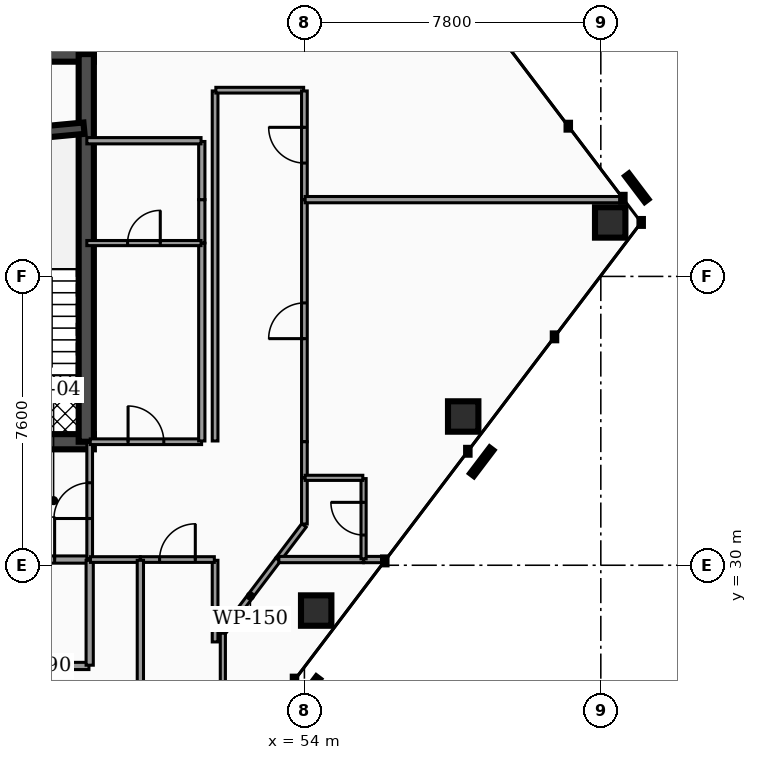
"""IFC4 building model, lengths in metres.
Left out: names, types, materials, properties, quantities, classifications, styles, units other than length and angle.
Written with IfcOpenShell. Run it as: python <this file> out.ifc"""

import sys

from ifc_helpers import new_model, si_unit, direction, frame, frame_2d, origin, origin_2d, place, context, subcontext, project, spatial, rectangle, hollow_rectangle, extrude, element, fill, save


model = new_model("IFC4")
c1 = context("Model", 3, precision=1e-05, world=origin(), true_north=direction((0.0, 1.0)))
c2 = subcontext(c1, "Body", "Model", "MODEL_VIEW")
j1 = project(units=[si_unit("LENGTHUNIT", "METRE"), si_unit("PLANEANGLEUNIT", "RADIAN")], contexts=[c1])
p1 = place(None, origin())
s1 = spatial("IfcSite", under=j1, at=p1, CompositionType="ELEMENT")
p2 = place(p1, origin())
s2 = spatial("IfcBuilding", under=s1, at=p2, CompositionType="ELEMENT")
p3 = place(p2, frame((0.0, 0.0, 138.38)))
s3 = spatial("IfcBuildingStorey", under=s2, at=p3, CompositionType="ELEMENT", Elevation=138.38)
p4 = place(p3, frame((28.4, 43.45, 0.0), z_axis=(0.0, 0.0, 1.0), x_axis=(1.0, 0.0, 0.0)))
e1 = element("IfcWall", 1, at=p4, inside=s3, PredefinedType="SHEAR", context=c2, shape_type="SweptSolid", body=[
    extrude(rectangle(XDim=20.06, YDim=0.4, at=frame_2d((10.03, 0.0))), origin(), (0.0, 0.0, 1.0), 3.5),
])
p5 = place(p3, frame((28.4, 33.25, 0.0), z_axis=(0.0, 0.0, 1.0), x_axis=(1.0, 0.0, 0.0)))
e2 = element("IfcWall", 2, at=p5, inside=s3, PredefinedType="SHEAR", context=c2, shape_type="SweptSolid", body=[
    extrude(rectangle(XDim=20.06, YDim=0.4, at=frame_2d((10.03, 0.0))), origin(), (0.0, 0.0, 1.0), 3.5),
])
p6 = place(p5, frame((4.03, 0.0, 0.0)))
e3 = element("IfcOpeningElement", 3, at=p6, cuts=e2, PredefinedType="OPENING", context=c2, shape_type="SweptSolid", body=[
    extrude(rectangle(XDim=1.1, YDim=2.15, at=frame_2d((0.55, 1.075))), frame((0.0, 0.21, 0.0), z_axis=(0.0, -1.0, 0.0), x_axis=(1.0, 0.0, 0.0)), (0.0, 0.0, 1.0), 0.42),
])
p7 = place(p5, frame((14.87, 0.0, 0.0)))
e4 = element("IfcOpeningElement", 4, at=p7, cuts=e2, PredefinedType="OPENING", context=c2, shape_type="SweptSolid", body=[
    extrude(rectangle(XDim=1.1, YDim=2.15, at=frame_2d((0.55, 1.075))), frame((0.0, 0.21, 0.0), z_axis=(0.0, -1.0, 0.0), x_axis=(1.0, 0.0, 0.0)), (0.0, 0.0, 1.0), 0.42),
])
p8 = place(p5, frame((5.95, 0.0, 0.0)))
e5 = element("IfcOpeningElement", 5, at=p8, cuts=e2, PredefinedType="OPENING", context=c2, shape_type="SweptSolid", body=[
    extrude(rectangle(XDim=1.0, YDim=2.1, at=frame_2d((0.5, 1.05))), frame((0.0, 0.21, 0.0), z_axis=(0.0, -1.0, 0.0), x_axis=(1.0, 0.0, 0.0)), (0.0, 0.0, 1.0), 0.42),
])
p9 = place(p5, frame((7.65, 0.0, 0.0)))
e6 = element("IfcOpeningElement", 6, at=p9, cuts=e2, PredefinedType="OPENING", context=c2, shape_type="SweptSolid", body=[
    extrude(rectangle(XDim=1.0, YDim=2.1, at=frame_2d((0.5, 1.05))), frame((0.0, 0.21, 0.0), z_axis=(0.0, -1.0, 0.0), x_axis=(1.0, 0.0, 0.0)), (0.0, 0.0, 1.0), 0.42),
])
p10 = place(p5, frame((1.31, 0.0, 0.0)))
e7 = element("IfcOpeningElement", 7, at=p10, cuts=e2, PredefinedType="OPENING", context=c2, shape_type="SweptSolid", body=[
    extrude(rectangle(XDim=1.1, YDim=2.2, at=frame_2d((0.55, 1.1))), frame((0.0, 0.21, 0.0), z_axis=(0.0, -1.0, 0.0), x_axis=(1.0, 0.0, 0.0)), (0.0, 0.0, 1.0), 0.42),
])
p11 = place(p5, frame((9.44, 0.0, 0.0)))
e8 = element("IfcOpeningElement", 8, at=p11, cuts=e2, PredefinedType="OPENING", context=c2, shape_type="SweptSolid", body=[
    extrude(rectangle(XDim=1.12, YDim=2.05, at=frame_2d((0.56, 1.025))), frame((0.0, 0.21, 0.0), z_axis=(0.0, -1.0, 0.0), x_axis=(1.0, 0.0, 0.0)), (0.0, 0.0, 1.0), 0.42),
])
p12 = place(p5, frame((17.65, 0.0, 0.0)))
e9 = element("IfcOpeningElement", 9, at=p12, cuts=e2, PredefinedType="OPENING", context=c2, shape_type="SweptSolid", body=[
    extrude(rectangle(XDim=1.1, YDim=2.2, at=frame_2d((0.55, 1.1))), frame((0.0, 0.21, 0.0), z_axis=(0.0, -1.0, 0.0), x_axis=(1.0, 0.0, 0.0)), (0.0, 0.0, 1.0), 0.42),
])
p13 = place(p3, frame((48.26, 33.25, 0.0), z_axis=(0.0, 0.0, 1.0), x_axis=(0.0, 1.0, 0.0)))
e10 = element("IfcWall", 10, at=p13, inside=s3, PredefinedType="SHEAR", context=c2, shape_type="SweptSolid", body=[
    extrude(rectangle(XDim=10.2, YDim=0.4, at=frame_2d((5.1, 0.0))), origin(), (0.0, 0.0, 1.0), 3.5),
])
p14 = place(p3, frame((44.98, 41.2, 0.0), z_axis=(0.0, 0.0, 1.0), x_axis=(0.995686468965, 0.09278176286, 0.0)))
e11 = element("IfcWall", 11, at=p14, inside=s3, PredefinedType="SHEAR", context=c2, shape_type="SweptSolid", body=[
    extrude(rectangle(XDim=3.234, YDim=0.3, at=frame_2d((1.617, 0.0))), origin(), (0.0, 0.0, 1.0), 3.5),
])
for number, where, z_axis, x_axis in (
    (12, (54.31, 28.808, 0.0), (0.0, 0.0, 1.0), (1.0, 0.0, 0.0)),
    (13, (58.178, 33.914, 0.0), (0.0, 0.0, 1.0), (1.0, 0.0, 0.0)),
    (14, (62.047, 39.02, 0.0), (0.0, 0.0, 1.0), (1.0, 0.0, 0.0)),
):
    element("IfcColumn", number, at=place(p3, frame(where, z_axis=z_axis, x_axis=x_axis)), inside=s3, PredefinedType="COLUMN", context=c2, shape_type="SweptSolid", body=[
        extrude(hollow_rectangle(XDim=0.8, YDim=0.8, WallThickness=0.04, at=origin_2d()), origin(), (0.0, 0.0, 1.0), 3.5),
    ])
p15 = place(p3, frame((45.405, 30.15, 0.0), z_axis=(0.0, 0.0, 1.0), x_axis=(1.0, 0.0, 0.0)))
e15 = element("IfcWall", 15, at=p15, inside=s3, PredefinedType="PARTITIONING", context=c2, shape_type="SweptSolid", body=[
    extrude(rectangle(XDim=2.925, YDim=0.19, at=frame_2d((1.462, 0.0))), origin(), (0.0, 0.0, 1.0), 2.457),
])
p16 = place(p15, frame((0.903, 0.0, 0.0)))
e16 = element("IfcOpeningElement", 16, at=p16, cuts=e15, PredefinedType="OPENING", context=c2, shape_type="SweptSolid", body=[
    extrude(rectangle(XDim=1.12, YDim=2.05, at=frame_2d((0.56, 1.025))), frame((0.0, 0.105, 0.0), z_axis=(0.0, -1.0, 0.0), x_axis=(1.0, 0.0, 0.0)), (0.0, 0.0, 1.0), 0.21),
])
p17 = place(p3, frame((48.35, 30.17, 0.0), z_axis=(0.0, 0.0, 1.0), x_axis=(0.0, 1.0, 0.0)))
e17 = element("IfcWall", 17, at=p17, inside=s3, PredefinedType="PARTITIONING", context=c2, shape_type="SweptSolid", body=[
    extrude(rectangle(XDim=3.06, YDim=0.15, at=frame_2d((1.53, 0.0))), origin(), (0.0, 0.0, 1.0), 2.457),
])
p18 = place(p17, frame((1.06, 0.0, 0.0)))
e18 = element("IfcOpeningElement", 18, at=p18, cuts=e17, PredefinedType="OPENING", context=c2, shape_type="SweptSolid", body=[
    extrude(rectangle(XDim=0.94, YDim=2.05, at=frame_2d((0.47, 1.025))), frame((0.0, 0.085, 0.0), z_axis=(0.0, -1.0, 0.0), x_axis=(1.0, 0.0, 0.0)), (0.0, 0.0, 1.0), 0.17),
])
p19 = place(p3, frame((45.42, 27.35, 0.0), z_axis=(0.0, 0.0, 1.0), x_axis=(1.0, 0.0, 0.0)))
e19 = element("IfcWall", 19, at=p19, inside=s3, PredefinedType="PARTITIONING", context=c2, shape_type="SweptSolid", body=[
    extrude(rectangle(XDim=2.91, YDim=0.19, at=frame_2d((1.455, 0.0))), origin(), (0.0, 0.0, 1.0), 2.457),
])
p20 = place(p3, frame((48.35, 27.37, 0.0), z_axis=(0.0, 0.0, 1.0), x_axis=(0.0, 1.0, 0.0)))
e20 = element("IfcWall", 20, at=p20, inside=s3, PredefinedType="PARTITIONING", context=c2, shape_type="SweptSolid", body=[
    extrude(rectangle(XDim=2.76, YDim=0.19, at=frame_2d((1.38, 0.0))), origin(), (0.0, 0.0, 1.0), 2.457),
])
p21 = place(p3, frame((48.37, 30.15, 0.0), z_axis=(0.0, 0.0, 1.0), x_axis=(1.0, 0.0, 0.0)))
e21 = element("IfcWall", 21, at=p21, inside=s3, PredefinedType="PARTITIONING", context=c2, shape_type="SweptSolid", body=[
    extrude(rectangle(XDim=1.309, YDim=0.15, at=frame_2d((0.654, 0.0))), origin(), (0.0, 0.0, 1.0), 2.457),
])
p22 = place(p3, frame((51.65, 27.982, 0.0), z_axis=(0.0, 0.0, 1.0), x_axis=(0.0, 1.0, 0.0)))
e22 = element("IfcWall", 22, at=p22, inside=s3, PredefinedType="PARTITIONING", context=c2, shape_type="SweptSolid", body=[
    extrude(rectangle(XDim=2.147, YDim=0.15, at=frame_2d((1.074, 0.0))), origin(), (0.0, 0.0, 1.0), 2.457),
])
p23 = place(p3, frame((49.689, 30.15, 0.0), z_axis=(0.0, 0.0, 1.0), x_axis=(1.0, 0.0, 0.0)))
e23 = element("IfcWall", 23, at=p23, inside=s3, PredefinedType="PARTITIONING", context=c2, shape_type="SweptSolid", body=[
    extrude(rectangle(XDim=1.941, YDim=0.15, at=frame_2d((0.971, 0.0))), origin(), (0.0, 0.0, 1.0), 2.457),
])
p24 = place(p23, frame((0.501, 0.0, 0.0)))
e24 = element("IfcOpeningElement", 24, at=p24, cuts=e23, PredefinedType="OPENING", context=c2, shape_type="SweptSolid", body=[
    extrude(rectangle(XDim=0.94, YDim=2.05, at=frame_2d((0.47, 1.025))), frame((0.0, 0.085, 0.0), z_axis=(0.0, -1.0, 0.0), x_axis=(1.0, 0.0, 0.0)), (0.0, 0.0, 1.0), 0.17),
])
p25 = place(p3, frame((51.851, 28.228, 0.0), z_axis=(0.0, 0.0, 1.0), x_axis=(0.60378553019, 0.797146808018, 0.0)))
e25 = element("IfcWall", 25, at=p25, inside=s3, PredefinedType="PARTITIONING", context=c2, shape_type="SweptSolid", body=[
    extrude(rectangle(XDim=2.41, YDim=0.15, at=frame_2d((1.205, 0.0))), origin(), (0.0, 0.0, 1.0), 2.457),
])
p26 = place(p3, frame((54.0, 33.25, 0.0), z_axis=(0.0, 0.0, 1.0), x_axis=(0.0, 1.0, 0.0)))
e26 = element("IfcWall", 26, at=p26, inside=s3, PredefinedType="PARTITIONING", context=c2, shape_type="SweptSolid", body=[
    extrude(rectangle(XDim=6.365, YDim=0.15, at=frame_2d((3.183, 0.0))), origin(), (0.0, 0.0, 1.0), 2.457),
])
p27 = place(p26, frame((2.712, 0.0, 0.0)))
e27 = element("IfcOpeningElement", 27, at=p27, cuts=e26, PredefinedType="OPENING", context=c2, shape_type="SweptSolid", body=[
    extrude(rectangle(XDim=0.94, YDim=2.05, at=frame_2d((0.47, 1.025))), frame((0.0, 0.085, 0.0), z_axis=(0.0, -1.0, 0.0), x_axis=(1.0, 0.0, 0.0)), (0.0, 0.0, 1.0), 0.17),
])
p28 = place(p3, frame((54.0, 32.305, 0.0), z_axis=(0.0, 0.0, 1.0), x_axis=(0.0, 1.0, 0.0)))
e28 = element("IfcWall", 28, at=p28, inside=s3, PredefinedType="PARTITIONING", context=c2, shape_type="SweptSolid", body=[
    extrude(rectangle(XDim=0.945, YDim=0.15, at=frame_2d((0.473, 0.0))), origin(), (0.0, 0.0, 1.0), 2.457),
])
p29 = place(p3, frame((54.0, 31.085, 0.0), z_axis=(0.0, 0.0, 1.0), x_axis=(0.0, 1.0, 0.0)))
e29 = element("IfcWall", 29, at=p29, inside=s3, PredefinedType="PARTITIONING", context=c2, shape_type="SweptSolid", body=[
    extrude(rectangle(XDim=1.21, YDim=0.15, at=frame_2d((0.605, 0.0))), origin(), (0.0, 0.0, 1.0), 2.457),
])
p30 = place(p3, frame((53.31, 30.154, 0.0), z_axis=(0.0, 0.0, 1.0), x_axis=(0.603752960425, 0.797171476395, 0.0)))
e30 = element("IfcWall", 30, at=p30, inside=s3, PredefinedType="PARTITIONING", context=c2, shape_type="SweptSolid", body=[
    extrude(rectangle(XDim=1.122, YDim=0.15, at=frame_2d((0.561, 0.0))), origin(), (0.0, 0.0, 1.0), 2.457),
])
p31 = place(p3, frame((51.65, 33.27, 0.0), z_axis=(0.0, 0.0, 1.0), x_axis=(0.0, 1.0, 0.0)))
e31 = element("IfcWall", 31, at=p31, inside=s3, PredefinedType="PARTITIONING", context=c2, shape_type="SweptSolid", body=[
    extrude(rectangle(XDim=9.21, YDim=0.15, at=frame_2d((4.605, 0.0))), origin(), (0.0, 0.0, 1.0), 2.457),
])
p32 = place(p3, frame((51.67, 42.5, 0.0), z_axis=(0.0, 0.0, 1.0), x_axis=(1.0, 0.0, 0.0)))
e32 = element("IfcWall", 32, at=p32, inside=s3, PredefinedType="PARTITIONING", context=c2, shape_type="SweptSolid", body=[
    extrude(rectangle(XDim=2.31, YDim=0.15, at=frame_2d((1.155, 0.0))), origin(), (0.0, 0.0, 1.0), 2.457),
])
p33 = place(p3, frame((54.0, 39.625, 0.0), z_axis=(0.0, 0.0, 1.0), x_axis=(0.0, 1.0, 0.0)))
e33 = element("IfcWall", 33, at=p33, inside=s3, PredefinedType="PARTITIONING", context=c2, shape_type="SweptSolid", body=[
    extrude(rectangle(XDim=2.855, YDim=0.15, at=frame_2d((1.427, 0.0))), origin(), (0.0, 0.0, 1.0), 2.457),
])
p34 = place(p33, frame((0.958, 0.0, 0.0)))
e34 = element("IfcOpeningElement", 34, at=p34, cuts=e33, PredefinedType="OPENING", context=c2, shape_type="SweptSolid", body=[
    extrude(rectangle(XDim=0.94, YDim=2.05, at=frame_2d((0.47, 1.025))), frame((0.0, 0.085, 0.0), z_axis=(0.0, -1.0, 0.0), x_axis=(1.0, 0.0, 0.0)), (0.0, 0.0, 1.0), 0.17),
])
p35 = place(p3, frame((48.365, 33.25, 0.0), z_axis=(0.0, 0.0, 1.0), x_axis=(1.0, 0.0, 0.0)))
e35 = element("IfcWall", 35, at=p35, inside=s3, PredefinedType="PARTITIONING", context=c2, shape_type="SweptSolid", body=[
    extrude(rectangle(XDim=2.93, YDim=0.15, at=frame_2d((1.465, 0.0))), origin(), (0.0, 0.0, 1.0), 2.457),
])
p36 = place(p35, frame((0.995, 0.0, 0.0)))
e36 = element("IfcOpeningElement", 36, at=p36, cuts=e35, PredefinedType="OPENING", context=c2, shape_type="SweptSolid", body=[
    extrude(rectangle(XDim=0.94, YDim=2.05, at=frame_2d((0.47, 1.025))), frame((0.0, 0.085, 0.0), z_axis=(0.0, -1.0, 0.0), x_axis=(1.0, 0.0, 0.0)), (0.0, 0.0, 1.0), 0.17),
])
p37 = place(p3, frame((49.684, 24.078, 0.0), z_axis=(0.0, 0.0, 1.0), x_axis=(0.0, 1.0, 0.0)))
e37 = element("IfcWall", 37, at=p37, inside=s3, PredefinedType="PARTITIONING", context=c2, shape_type="SweptSolid", body=[
    extrude(rectangle(XDim=6.052, YDim=0.165, at=frame_2d((3.026, 0.0))), origin(), (0.0, 0.0, 1.0), 2.457),
])
p38 = place(p3, frame((51.854, 24.504, 0.0), z_axis=(0.0, 0.0, 1.0), x_axis=(0.0, 1.0, 0.0)))
e38 = element("IfcWall", 38, at=p38, inside=s3, PredefinedType="PARTITIONING", context=c2, shape_type="SweptSolid", body=[
    extrude(rectangle(XDim=3.708, YDim=0.135, at=frame_2d((1.854, 0.0))), origin(), (0.0, 0.0, 1.0), 2.457),
])
p39 = place(p38, frame((1.424, 0.0, 0.0)))
e39 = element("IfcOpeningElement", 39, at=p39, cuts=e38, PredefinedType="OPENING", context=c2, shape_type="SweptSolid", body=[
    extrude(rectangle(XDim=0.86, YDim=2.05, at=frame_2d((0.43, 1.025))), frame((0.0, 0.077, 0.0), z_axis=(0.0, -1.0, 0.0), x_axis=(1.0, 0.0, 0.0)), (0.0, 0.0, 1.0), 0.155),
])
p40 = place(p3, frame((55.562, 30.15, 0.0), z_axis=(0.0, 0.0, 1.0), x_axis=(1.0, 0.0, 0.0)))
e40 = element("IfcWall", 40, at=p40, inside=s3, PredefinedType="PARTITIONING", context=c2, shape_type="SweptSolid", body=[
    extrude(rectangle(XDim=0.565, YDim=0.165, at=frame_2d((0.283, 0.0))), origin(), (0.0, 0.0, 1.0), 2.457),
])
p41 = place(p3, frame((53.327, 30.15, 0.0), z_axis=(0.0, 0.0, 1.0), x_axis=(1.0, 0.0, 0.0)))
e41 = element("IfcWall", 41, at=p41, inside=s3, PredefinedType="PARTITIONING", context=c2, shape_type="SweptSolid", body=[
    extrude(rectangle(XDim=2.225, YDim=0.165, at=frame_2d((1.113, 0.0))), origin(), (0.0, 0.0, 1.0), 2.457),
])
p42 = place(p3, frame((55.557, 30.17, 0.0), z_axis=(0.0, 0.0, 1.0), x_axis=(0.0, 1.0, 0.0)))
e42 = element("IfcWall", 42, at=p42, inside=s3, PredefinedType="PARTITIONING", context=c2, shape_type="SweptSolid", body=[
    extrude(rectangle(XDim=2.11, YDim=0.135, at=frame_2d((1.055, 0.0))), origin(), (0.0, 0.0, 1.0), 2.457),
])
p43 = place(p42, frame((0.625, 0.0, 0.0)))
e43 = element("IfcOpeningElement", 43, at=p43, cuts=e42, PredefinedType="OPENING", context=c2, shape_type="SweptSolid", body=[
    extrude(rectangle(XDim=0.86, YDim=2.05, at=frame_2d((0.43, 1.025))), frame((0.0, 0.077, 0.0), z_axis=(0.0, -1.0, 0.0), x_axis=(1.0, 0.0, 0.0)), (0.0, 0.0, 1.0), 0.155),
])
p44 = place(p3, frame((54.02, 32.3, 0.0), z_axis=(0.0, 0.0, 1.0), x_axis=(1.0, 0.0, 0.0)))
e44 = element("IfcWall", 44, at=p44, inside=s3, PredefinedType="PARTITIONING", context=c2, shape_type="SweptSolid", body=[
    extrude(rectangle(XDim=1.517, YDim=0.135, at=frame_2d((0.759, 0.0))), origin(), (0.0, 0.0, 1.0), 2.457),
])
p45 = place(p3, frame((54.02, 39.62, 0.0), z_axis=(0.0, 0.0, 1.0), x_axis=(1.0, 0.0, 0.0)))
e45 = element("IfcWall", 45, at=p45, inside=s3, PredefinedType="PARTITIONING", context=c2, shape_type="SweptSolid", body=[
    extrude(rectangle(XDim=8.373, YDim=0.165, at=frame_2d((4.186, 0.0))), origin(), (0.0, 0.0, 1.0), 2.457),
])
p46 = place(p3, frame((51.3, 33.27, 0.0), z_axis=(0.0, 0.0, 1.0), x_axis=(0.0, 1.0, 0.0)))
e46 = element("IfcWall", 46, at=p46, inside=s3, PredefinedType="PARTITIONING", context=c2, shape_type="SweptSolid", body=[
    extrude(rectangle(XDim=5.202, YDim=0.165, at=frame_2d((2.601, 0.0))), origin(), (0.0, 0.0, 1.0), 2.457),
])
p47 = place(p3, frame((51.3, 38.482, 0.0), z_axis=(0.0, 0.0, 1.0), x_axis=(0.0, 1.0, 0.0)))
e47 = element("IfcWall", 47, at=p47, inside=s3, PredefinedType="PARTITIONING", context=c2, shape_type="SweptSolid", body=[
    extrude(rectangle(XDim=1.138, YDim=0.165, at=frame_2d((0.569, 0.0))), origin(), (0.0, 0.0, 1.0), 2.457),
])
p48 = place(p3, frame((51.3, 39.62, 0.0), z_axis=(0.0, 0.0, 1.0), x_axis=(0.0, 1.0, 0.0)))
e48 = element("IfcWall", 48, at=p48, inside=s3, PredefinedType="PARTITIONING", context=c2, shape_type="SweptSolid", body=[
    extrude(rectangle(XDim=1.53, YDim=0.165, at=frame_2d((0.765, 0.0))), origin(), (0.0, 0.0, 1.0), 2.457),
])
p49 = place(p3, frame((48.275, 41.17, 0.0), z_axis=(0.0, 0.0, 1.0), x_axis=(1.0, 0.0, 0.0)))
e49 = element("IfcWall", 49, at=p49, inside=s3, PredefinedType="PARTITIONING", context=c2, shape_type="SweptSolid", body=[
    extrude(rectangle(XDim=3.005, YDim=0.165, at=frame_2d((1.502, 0.0))), origin(), (0.0, 0.0, 1.0), 2.457),
])
p50 = place(p3, frame((48.275, 38.477, 0.0), z_axis=(0.0, 0.0, 1.0), x_axis=(1.0, 0.0, 0.0)))
e50 = element("IfcWall", 50, at=p50, inside=s3, PredefinedType="PARTITIONING", context=c2, shape_type="SweptSolid", body=[
    extrude(rectangle(XDim=3.005, YDim=0.135, at=frame_2d((1.502, 0.0))), origin(), (0.0, 0.0, 1.0), 2.457),
])
p51 = place(p50, frame((1.073, 0.0, 0.0)))
e51 = element("IfcOpeningElement", 51, at=p51, cuts=e50, PredefinedType="OPENING", context=c2, shape_type="SweptSolid", body=[
    extrude(rectangle(XDim=0.86, YDim=2.05, at=frame_2d((0.43, 1.025))), frame((0.0, 0.077, 0.0), z_axis=(0.0, -1.0, 0.0), x_axis=(1.0, 0.0, 0.0)), (0.0, 0.0, 1.0), 0.155),
])
p52 = place(p16, origin())
e52 = element("IfcDoor", 52, at=p52, inside=s3, OperationType="SINGLE_SWING_RIGHT", PredefinedType="DOOR", context=c2, shape_type="SweptSolid", body=[
    extrude(rectangle(XDim=1.12, YDim=2.05, at=frame_2d((0.56, 1.025))), frame((0.0, 0.025, 0.0), z_axis=(0.0, -1.0, 0.0), x_axis=(1.0, 0.0, 0.0)), (0.0, 0.0, 1.0), 0.05),
])
fill(e16, e52)
p53 = place(p18, origin())
e53 = element("IfcDoor", 53, at=p53, inside=s3, OperationType="SINGLE_SWING_LEFT", PredefinedType="DOOR", context=c2, shape_type="SweptSolid", body=[
    extrude(rectangle(XDim=0.94, YDim=2.05, at=frame_2d((0.47, 1.025))), frame((0.0, 0.025, 0.0), z_axis=(0.0, -1.0, 0.0), x_axis=(1.0, 0.0, 0.0)), (0.0, 0.0, 1.0), 0.05),
])
fill(e18, e53)
p54 = place(p24, origin())
e54 = element("IfcDoor", 54, at=p54, inside=s3, OperationType="SINGLE_SWING_RIGHT", PredefinedType="DOOR", context=c2, shape_type="SweptSolid", body=[
    extrude(rectangle(XDim=0.94, YDim=2.05, at=frame_2d((0.47, 1.025))), frame((0.0, 0.025, 0.0), z_axis=(0.0, -1.0, 0.0), x_axis=(1.0, 0.0, 0.0)), (0.0, 0.0, 1.0), 0.05),
])
fill(e24, e54)
p55 = place(p27, origin())
e55 = element("IfcDoor", 55, at=p55, inside=s3, OperationType="SINGLE_SWING_LEFT", PredefinedType="DOOR", context=c2, shape_type="SweptSolid", body=[
    extrude(rectangle(XDim=0.94, YDim=2.05, at=frame_2d((0.47, 1.025))), frame((0.0, 0.025, 0.0), z_axis=(0.0, -1.0, 0.0), x_axis=(1.0, 0.0, 0.0)), (0.0, 0.0, 1.0), 0.05),
])
fill(e27, e55)
p56 = place(p34, origin())
e56 = element("IfcDoor", 56, at=p56, inside=s3, OperationType="SINGLE_SWING_RIGHT", PredefinedType="DOOR", context=c2, shape_type="SweptSolid", body=[
    extrude(rectangle(XDim=0.94, YDim=2.05, at=frame_2d((0.47, 1.025))), frame((0.0, 0.025, 0.0), z_axis=(0.0, -1.0, 0.0), x_axis=(1.0, 0.0, 0.0)), (0.0, 0.0, 1.0), 0.05),
])
fill(e34, e56)
p57 = place(p36, origin())
e57 = element("IfcDoor", 57, at=p57, inside=s3, OperationType="SINGLE_SWING_LEFT", PredefinedType="DOOR", context=c2, shape_type="SweptSolid", body=[
    extrude(rectangle(XDim=0.94, YDim=2.05, at=frame_2d((0.47, 1.025))), frame((0.0, 0.025, 0.0), z_axis=(0.0, -1.0, 0.0), x_axis=(1.0, 0.0, 0.0)), (0.0, 0.0, 1.0), 0.05),
])
fill(e36, e57)
p58 = place(p43, origin())
e58 = element("IfcDoor", 58, at=p58, inside=s3, OperationType="SINGLE_SWING_RIGHT", PredefinedType="DOOR", context=c2, shape_type="SweptSolid", body=[
    extrude(rectangle(XDim=0.86, YDim=2.05, at=frame_2d((0.43, 1.025))), frame((0.0, 0.025, 0.0), z_axis=(0.0, -1.0, 0.0), x_axis=(1.0, 0.0, 0.0)), (0.0, 0.0, 1.0), 0.05),
])
fill(e43, e58)
p59 = place(p51, origin())
e59 = element("IfcDoor", 59, at=p59, inside=s3, OperationType="SINGLE_SWING_RIGHT", PredefinedType="DOOR", context=c2, shape_type="SweptSolid", body=[
    extrude(rectangle(XDim=0.86, YDim=2.05, at=frame_2d((0.43, 1.025))), frame((0.0, 0.025, 0.0), z_axis=(0.0, -1.0, 0.0), x_axis=(1.0, 0.0, 0.0)), (0.0, 0.0, 1.0), 0.05),
])
fill(e51, e59)
save(model, sys.argv[1])
